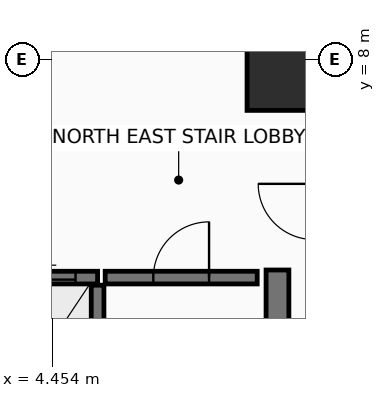
"""IFC4 building model, lengths in metres.
Left out: names, types, materials, properties, quantities, classifications, styles, units other than length and angle.
Written with IfcOpenShell. Run it as: python <this file> out.ifc"""

import sys

from ifc_helpers import new_model, si_unit, direction, frame, frame_2d, origin, origin_2d, place, context, subcontext, project, spatial, rectangle, extrude, element, fill, save


model = new_model("IFC4")
c1 = context("Model", 3, precision=1e-05, world=origin(), true_north=direction((0.0, 1.0)))
c2 = subcontext(c1, "Body", "Model", "MODEL_VIEW")
j1 = project(units=[si_unit("LENGTHUNIT", "METRE"), si_unit("PLANEANGLEUNIT", "RADIAN")], contexts=[c1])
p1 = place(None, origin())
s1 = spatial("IfcSite", under=j1, at=p1, CompositionType="ELEMENT")
p2 = place(p1, origin())
s2 = spatial("IfcBuilding", under=s1, at=p2, CompositionType="ELEMENT")
p3 = place(p2, frame((0.0, 0.0, 93.3)))
s3 = spatial("IfcBuildingStorey", under=s2, at=p3, CompositionType="ELEMENT", Elevation=93.3)
p4 = place(p3, frame((8.9, 7.6, 0.0), z_axis=(0.0, 0.0, 1.0), x_axis=(1.0, 0.0, 0.0)))
e1 = element("IfcColumn", 1, at=p4, inside=s3, PredefinedType="COLUMN", context=c2, shape_type="SweptSolid", body=[
    extrude(rectangle(XDim=1.2, YDim=1.2, at=origin_2d()), origin(), (0.0, 0.0, 1.0), 3.6),
])
p5 = place(p3, frame((8.9, -6.85, 0.0), z_axis=(0.0, 0.0, 1.0), x_axis=(0.0, 1.0, 0.0)))
e2 = element("IfcWall", 2, at=p5, inside=s3, PredefinedType="SHEAR", context=c2, shape_type="SweptSolid", body=[
    extrude(rectangle(XDim=10.7, YDim=0.45, at=frame_2d((5.35, 0.0))), origin(), (0.0, 0.0, 1.0), 3.41),
])
p6 = place(p3, frame((5.35, -3.75, 0.0), z_axis=(0.0, 0.0, 1.0), x_axis=(0.0, 1.0, 0.0)))
e3 = element("IfcWall", 3, at=p6, inside=s3, PredefinedType="SHEAR", context=c2, shape_type="SweptSolid", body=[
    extrude(rectangle(XDim=7.3, YDim=0.25, at=frame_2d((3.65, 0.0))), origin(), (0.0, 0.0, 1.0), 3.41),
])
p7 = place(p3, frame((5.5, 3.7, 0.0), z_axis=(0.0, 0.0, 1.0), x_axis=(1.0, 0.0, 0.0)))
e4 = element("IfcWall", 4, at=p7, inside=s3, PredefinedType="SHEAR", context=c2, shape_type="SweptSolid", body=[
    extrude(rectangle(XDim=3.0, YDim=0.25, at=frame_2d((1.5, 0.0))), origin(), (0.0, 0.0, 1.0), 3.41),
])
p8 = place(p7, frame((0.95, 0.0, 0.0)))
e5 = element("IfcOpeningElement", 5, at=p8, cuts=e4, PredefinedType="OPENING", context=c2, shape_type="SweptSolid", body=[
    extrude(rectangle(XDim=1.1, YDim=2.15, at=frame_2d((0.55, 1.075))), frame((0.0, 0.135, 0.0), z_axis=(0.0, -1.0, 0.0), x_axis=(1.0, 0.0, 0.0)), (0.0, 0.0, 1.0), 0.27),
])
p9 = place(p3, frame((3.28, 3.7, 0.0), z_axis=(0.0, 0.0, 1.0), x_axis=(1.0, 0.0, 0.0)))
e6 = element("IfcWall", 6, at=p9, inside=s3, PredefinedType="SHEAR", context=c2, shape_type="SweptSolid", body=[
    extrude(rectangle(XDim=2.07, YDim=0.25, at=frame_2d((1.035, 0.0))), origin(), (0.0, 0.0, 1.0), 3.41),
])
p10 = place(p9, frame((0.435, 0.0, 0.0)))
e7 = element("IfcOpeningElement", 7, at=p10, cuts=e6, PredefinedType="OPENING", context=c2, shape_type="SweptSolid", body=[
    extrude(rectangle(XDim=1.2, YDim=2.2, at=frame_2d((0.6, 1.1))), frame((0.0, 0.135, 0.0), z_axis=(0.0, -1.0, 0.0), x_axis=(1.0, 0.0, 0.0)), (0.0, 0.0, 1.0), 0.27),
])
p11 = place(p8, frame((1.1, 0.0, 0.0), z_axis=(0.0, 0.0, 1.0), x_axis=(-1.0, 0.0, 0.0)))
e8 = element("IfcDoor", 8, at=p11, inside=s3, OperationType="SINGLE_SWING_LEFT", PredefinedType="DOOR", context=c2, shape_type="SweptSolid", body=[
    extrude(rectangle(XDim=1.1, YDim=2.15, at=frame_2d((0.55, 1.075))), frame((0.0, 0.025, 0.0), z_axis=(0.0, -1.0, 0.0), x_axis=(1.0, 0.0, 0.0)), (0.0, 0.0, 1.0), 0.05),
])
fill(e5, e8)
p12 = place(p10, origin())
e9 = element("IfcDoor", 9, at=p12, inside=s3, OperationType="SLIDING_TO_RIGHT", PredefinedType="DOOR", context=c2, shape_type="SweptSolid", body=[
    extrude(rectangle(XDim=1.2, YDim=2.2, at=frame_2d((0.6, 1.1))), frame((0.0, 0.025, 0.0), z_axis=(0.0, -1.0, 0.0), x_axis=(1.0, 0.0, 0.0)), (0.0, 0.0, 1.0), 0.05),
])
fill(e7, e9)
save(model, sys.argv[1])
